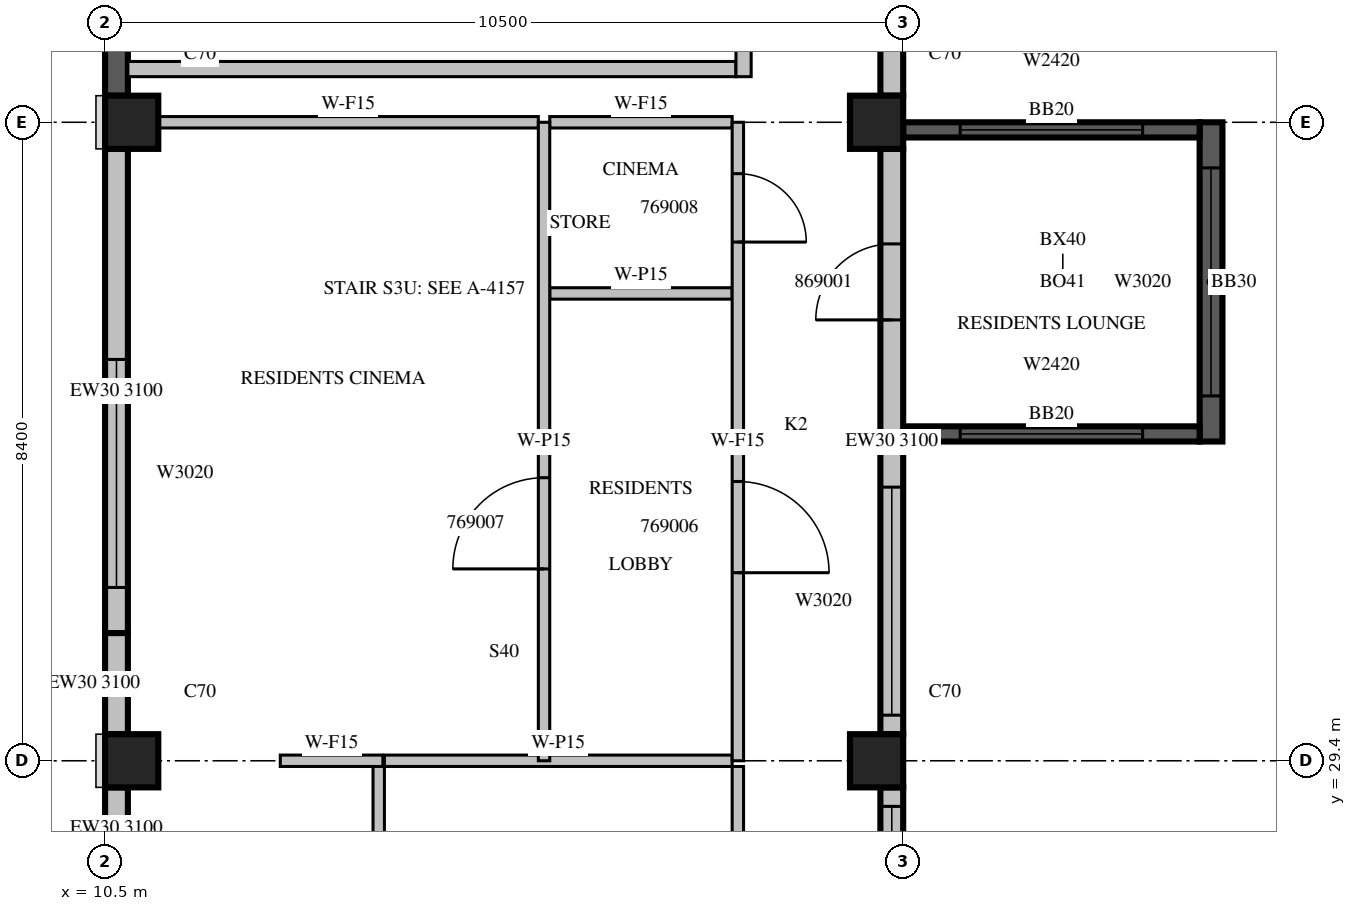
"""IFC4 building model, lengths in metres.
Left out: names, types, materials, properties, quantities, classifications, styles, units other than length and angle.
Written with IfcOpenShell. Run it as: python <this file> out.ifc"""

import sys

from ifc_helpers import new_model, si_unit, direction, frame, frame_2d, origin, origin_2d, place, context, subcontext, project, spatial, rectangle, extrude, source, transform, mapped, element, fill, save


model = new_model("IFC4")
c1 = context("Model", 3, precision=1e-05, world=origin(), true_north=direction((0.0, 1.0)))
c2 = subcontext(c1, "Body", "Model", "MODEL_VIEW")
j1 = project(units=[si_unit("LENGTHUNIT", "METRE"), si_unit("PLANEANGLEUNIT", "RADIAN")], contexts=[c1])
p1 = place(None, origin())
s1 = spatial("IfcSite", under=j1, at=p1, CompositionType="ELEMENT")
p2 = place(p1, origin())
s2 = spatial("IfcBuilding", under=s1, at=p2, CompositionType="ELEMENT")
p3 = place(p2, frame((0.0, 0.0, 302.0)))
s3 = spatial("IfcBuildingStorey", under=s2, at=p3, CompositionType="ELEMENT", Elevation=302.0)
m1 = source(origin(), c2, "Body", "SweptSolid", [
    extrude(rectangle(XDim=0.7, YDim=0.7, at=origin_2d()), origin(), (0.0, 0.0, 1.0), 3.5),
])
for number, where, z_axis, x_axis in (
    (1, (10.85, 29.4, 0.0), (0.0, 0.0, 1.0), (1.0, 0.0, 0.0)),
    (2, (20.65, 29.4, 0.0), (0.0, 0.0, 1.0), (1.0, 0.0, 0.0)),
    (3, (10.85, 37.8, 0.0), (0.0, 0.0, 1.0), (1.0, 0.0, 0.0)),
    (4, (20.65, 37.8, 0.0), (0.0, 0.0, 1.0), (1.0, 0.0, 0.0)),
):
    element("IfcColumn", number, at=place(p3, frame(where, z_axis=z_axis, x_axis=x_axis)), inside=s3, PredefinedType="COLUMN", context=c2, shape_type="MappedRepresentation", body=[
        mapped(m1, transform((0.0, 0.0, 0.0), scale=1.0)),
    ])
p4 = place(p3, frame((25.05, 33.6, 0.0), z_axis=(0.0, 0.0, 1.0), x_axis=(0.0, 1.0, 0.0)))
e5 = element("IfcWall", 5, at=p4, inside=s3, PredefinedType="SOLIDWALL", context=c2, shape_type="SweptSolid", body=[
    extrude(rectangle(XDim=4.2, YDim=0.3, at=frame_2d((2.1, 0.0))), origin(), (0.0, 0.0, 1.0), 3.1),
])
m2 = source(origin(), c2, "Body", "SweptSolid", [
    extrude(rectangle(XDim=3.0, YDim=2.0, at=frame_2d((1.5, 1.0))), frame((0.0, 0.16, 0.0), z_axis=(0.0, -1.0, 0.0), x_axis=(1.0, 0.0, 0.0)), (0.0, 0.0, 1.0), 0.32),
])
p5 = place(p4, frame((0.6, 0.0, 0.6)))
e6 = element("IfcOpeningElement", 6, at=p5, cuts=e5, PredefinedType="OPENING", context=c2, shape_type="MappedRepresentation", body=[
    mapped(m2, transform((0.0, 0.0, 0.0), scale=1.0)),
])
m3 = source(origin(), c2, "Body", "SweptSolid", [
    extrude(rectangle(XDim=3.9, YDim=0.2, at=frame_2d((1.95, 0.0))), origin(), (0.0, 0.0, 1.0), 3.1),
])
p6 = place(p3, frame((21.0, 33.7, 0.0), z_axis=(0.0, 0.0, 1.0), x_axis=(1.0, 0.0, 0.0)))
e7 = element("IfcWall", 7, at=p6, inside=s3, PredefinedType="SOLIDWALL", context=c2, shape_type="MappedRepresentation", body=[
    mapped(m3, transform((0.0, 0.0, 0.0), scale=1.0)),
])
m4 = source(origin(), c2, "Body", "SweptSolid", [
    extrude(rectangle(XDim=2.4, YDim=2.0, at=frame_2d((1.2, 1.0))), frame((0.0, 0.11, 0.0), z_axis=(0.0, -1.0, 0.0), x_axis=(1.0, 0.0, 0.0)), (0.0, 0.0, 1.0), 0.22),
])
p7 = place(p6, frame((0.75, 0.0, 0.6)))
e8 = element("IfcOpeningElement", 8, at=p7, cuts=e7, PredefinedType="OPENING", context=c2, shape_type="MappedRepresentation", body=[
    mapped(m4, transform((0.0, 0.0, 0.0), scale=1.0)),
])
p8 = place(p3, frame((21.0, 37.7, 0.0), z_axis=(0.0, 0.0, 1.0), x_axis=(1.0, 0.0, 0.0)))
e9 = element("IfcWall", 9, at=p8, inside=s3, PredefinedType="SOLIDWALL", context=c2, shape_type="MappedRepresentation", body=[
    mapped(m3, transform((0.0, 0.0, 0.0), scale=1.0)),
])
p9 = place(p8, frame((0.75, 0.0, 0.6)))
e10 = element("IfcOpeningElement", 10, at=p9, cuts=e9, PredefinedType="OPENING", context=c2, shape_type="MappedRepresentation", body=[
    mapped(m4, transform((0.0, 0.0, 0.0), scale=1.0)),
])
m5 = source(origin(), c2, "Body", "SweptSolid", [
    extrude(rectangle(XDim=7.45, YDim=0.3, at=frame_2d((3.725, 0.0))), origin(), (0.0, 0.0, 1.0), 3.1),
])
p10 = place(p3, frame((20.85, 21.6, 0.0), z_axis=(0.0, 0.0, 1.0), x_axis=(0.0, 1.0, 0.0)))
e11 = element("IfcWall", 11, at=p10, inside=s3, PredefinedType="STANDARD", context=c2, shape_type="MappedRepresentation", body=[
    mapped(m5, transform((0.0, 0.0, 0.0), scale=1.0)),
])
m6 = source(origin(), c2, "Body", "SweptSolid", [
    extrude(rectangle(XDim=2.4, YDim=2.0, at=frame_2d((1.2, 1.0))), frame((0.0, 0.16, 0.0), z_axis=(0.0, -1.0, 0.0), x_axis=(1.0, 0.0, 0.0)), (0.0, 0.0, 1.0), 0.32),
])
p11 = place(p10, frame((0.3, 0.0, 0.6)))
e12 = element("IfcOpeningElement", 12, at=p11, cuts=e11, PredefinedType="OPENING", context=c2, shape_type="MappedRepresentation", body=[
    mapped(m6, transform((0.0, 0.0, 0.0), scale=1.0)),
])
p12 = place(p10, frame((4.2, 0.0, 0.6)))
e13 = element("IfcOpeningElement", 13, at=p12, cuts=e11, PredefinedType="OPENING", context=c2, shape_type="MappedRepresentation", body=[
    mapped(m2, transform((0.0, 0.0, 0.0), scale=1.0)),
])
m7 = source(origin(), c2, "Body", "SweptSolid", [
    extrude(rectangle(XDim=7.7, YDim=0.3, at=frame_2d((3.85, 0.0))), origin(), (0.0, 0.0, 1.0), 3.1),
])
p13 = place(p3, frame((20.85, 29.75, 0.0), z_axis=(0.0, 0.0, 1.0), x_axis=(0.0, 1.0, 0.0)))
e14 = element("IfcWall", 14, at=p13, inside=s3, PredefinedType="STANDARD", context=c2, shape_type="MappedRepresentation", body=[
    mapped(m7, transform((0.0, 0.0, 0.0), scale=1.0)),
])
p14 = place(p13, frame((0.25, 0.0, 0.6)))
e15 = element("IfcOpeningElement", 15, at=p14, cuts=e14, PredefinedType="OPENING", context=c2, shape_type="MappedRepresentation", body=[
    mapped(m2, transform((0.0, 0.0, 0.0), scale=1.0)),
])
m8 = source(origin(), c2, "Body", "SweptSolid", [
    extrude(rectangle(XDim=1.0, YDim=2.1, at=frame_2d((0.5, 1.05))), frame((0.0, 0.16, 0.0), z_axis=(0.0, -1.0, 0.0), x_axis=(1.0, 0.0, 0.0)), (0.0, 0.0, 1.0), 0.32),
])
p15 = place(p13, frame((5.45, 0.0, 0.0)))
e16 = element("IfcOpeningElement", 16, at=p15, cuts=e14, PredefinedType="OPENING", context=c2, shape_type="MappedRepresentation", body=[
    mapped(m8, transform((0.0, 0.0, 0.0), scale=1.0)),
])
m9 = source(origin(), c2, "Body", "SweptSolid", [
    extrude(rectangle(XDim=5.53, YDim=0.3, at=frame_2d((2.765, 0.0))), origin(), (0.0, 0.0, 1.0), 3.1),
])
p16 = place(p3, frame((20.85, 38.15, 0.0), z_axis=(0.0, 0.0, 1.0), x_axis=(0.0, 1.0, 0.0)))
e17 = element("IfcWall", 17, at=p16, inside=s3, PredefinedType="STANDARD", context=c2, shape_type="MappedRepresentation", body=[
    mapped(m9, transform((0.0, 0.0, 0.0), scale=1.0)),
])
m10 = source(origin(), c2, "Body", "SweptSolid", [
    extrude(rectangle(XDim=3.6, YDim=2.0, at=frame_2d((1.8, 1.0))), frame((0.0, 0.16, 0.0), z_axis=(0.0, -1.0, 0.0), x_axis=(1.0, 0.0, 0.0)), (0.0, 0.0, 1.0), 0.32),
])
p17 = place(p16, frame((0.79, 0.0, 0.6)))
e18 = element("IfcOpeningElement", 18, at=p17, cuts=e17, PredefinedType="OPENING", context=c2, shape_type="MappedRepresentation", body=[
    mapped(m10, transform((0.0, 0.0, 0.0), scale=1.0)),
])
m11 = source(origin(), c2, "Body", "SweptSolid", [
    extrude(rectangle(XDim=5.53, YDim=0.3, at=frame_2d((2.765, 0.0))), origin(), (0.0, 0.0, 1.0), 3.1),
])
p18 = place(p3, frame((10.65, 43.68, 0.0), z_axis=(0.0, 0.0, 1.0), x_axis=(0.0, -1.0, 0.0)))
e19 = element("IfcWall", 19, at=p18, inside=s3, PredefinedType="SOLIDWALL", context=c2, shape_type="MappedRepresentation", body=[
    mapped(m11, transform((0.0, 0.0, 0.0), scale=1.0)),
])
m12 = source(origin(), c2, "Body", "SweptSolid", [
    extrude(rectangle(XDim=6.37, YDim=0.3, at=frame_2d((3.185, 0.0))), origin(), (0.0, 0.0, 1.0), 3.1),
])
p19 = place(p3, frame((10.65, 37.45, 0.0), z_axis=(0.0, 0.0, 1.0), x_axis=(0.0, -1.0, 0.0)))
e20 = element("IfcWall", 20, at=p19, inside=s3, PredefinedType="STANDARD", context=c2, shape_type="MappedRepresentation", body=[
    mapped(m12, transform((0.0, 0.0, 0.0), scale=1.0)),
])
p20 = place(p19, frame((2.77, 0.0, 0.6)))
e21 = element("IfcOpeningElement", 21, at=p20, cuts=e20, PredefinedType="OPENING", context=c2, shape_type="MappedRepresentation", body=[
    mapped(m2, transform((0.0, 0.0, 0.0), scale=1.0)),
])
m13 = source(origin(), c2, "Body", "SweptSolid", [
    extrude(rectangle(XDim=1.33, YDim=0.3, at=frame_2d((0.665, 0.0))), origin(), (0.0, 0.0, 1.0), 3.1),
])
p21 = place(p3, frame((10.65, 31.08, 0.0), z_axis=(0.0, 0.0, 1.0), x_axis=(0.0, -1.0, 0.0)))
e22 = element("IfcWall", 22, at=p21, inside=s3, PredefinedType="STANDARD", context=c2, shape_type="MappedRepresentation", body=[
    mapped(m13, transform((0.0, 0.0, 0.0), scale=1.0)),
])
m14 = source(origin(), c2, "Body", "SweptSolid", [
    extrude(rectangle(XDim=2.17, YDim=0.3, at=frame_2d((1.085, 0.0))), origin(), (0.0, 0.0, 1.0), 3.1),
])
p22 = place(p3, frame((10.65, 29.05, 0.0), z_axis=(0.0, 0.0, 1.0), x_axis=(0.0, -1.0, 0.0)))
e23 = element("IfcWall", 23, at=p22, inside=s3, PredefinedType="STANDARD", context=c2, shape_type="MappedRepresentation", body=[
    mapped(m14, transform((0.0, 0.0, 0.0), scale=1.0)),
])
m15 = source(origin(), c2, "Body", "SweptSolid", [
    extrude(rectangle(XDim=1.2, YDim=2.0, at=frame_2d((0.6, 1.0))), frame((0.0, 0.16, 0.0), z_axis=(0.0, -1.0, 0.0), x_axis=(1.0, 0.0, 0.0)), (0.0, 0.0, 1.0), 0.32),
])
p23 = place(p22, frame((0.485, 0.0, 0.6)))
e24 = element("IfcOpeningElement", 24, at=p23, cuts=e23, PredefinedType="OPENING", context=c2, shape_type="MappedRepresentation", body=[
    mapped(m15, transform((0.0, 0.0, 0.0), scale=1.0)),
])
m16 = source(origin(), c2, "Body", "SweptSolid", [
    extrude(rectangle(XDim=8.0, YDim=0.2, at=frame_2d((4.0, 0.0))), origin(), (0.0, 0.0, 1.0), 3.1),
])
p24 = place(p3, frame((10.8, 38.5, 0.0), z_axis=(0.0, 0.0, 1.0), x_axis=(1.0, 0.0, 0.0)))
e25 = element("IfcWall", 25, at=p24, inside=s3, PredefinedType="PARTITIONING", context=c2, shape_type="MappedRepresentation", body=[
    mapped(m16, transform((0.0, 0.0, 0.0), scale=1.0)),
])
m17 = source(origin(), c2, "Body", "SweptSolid", [
    extrude(rectangle(XDim=5.45, YDim=0.2, at=frame_2d((2.725, 0.0))), origin(), (0.0, 0.0, 1.0), 3.1),
])
p25 = place(p3, frame((18.9, 38.4, 0.0), z_axis=(0.0, 0.0, 1.0), x_axis=(0.0, 1.0, 0.0)))
e26 = element("IfcWall", 26, at=p25, inside=s3, PredefinedType="PARTITIONING", context=c2, shape_type="MappedRepresentation", body=[
    mapped(m17, transform((0.0, 0.0, 0.0), scale=1.0)),
])
m18 = source(origin(), c2, "Body", "SweptSolid", [
    extrude(rectangle(XDim=1.2, YDim=2.1, at=frame_2d((0.6, 1.05))), frame((0.0, 0.11, 0.0), z_axis=(0.0, -1.0, 0.0), x_axis=(1.0, 0.0, 0.0)), (0.0, 0.0, 1.0), 0.22),
])
p26 = place(p25, frame((0.4, 0.0, 0.0)))
e27 = element("IfcOpeningElement", 27, at=p26, cuts=e26, PredefinedType="OPENING", context=c2, shape_type="MappedRepresentation", body=[
    mapped(m18, transform((0.0, 0.0, 0.0), scale=1.0)),
])
m19 = source(origin(), c2, "Body", "SweptSolid", [
    extrude(rectangle(XDim=0.9, YDim=2.1, at=frame_2d((0.45, 1.05))), frame((0.0, 0.11, 0.0), z_axis=(0.0, -1.0, 0.0), x_axis=(1.0, 0.0, 0.0)), (0.0, 0.0, 1.0), 0.22),
])
p27 = place(p25, frame((3.25, 0.0, 0.0)))
e28 = element("IfcOpeningElement", 28, at=p27, cuts=e26, PredefinedType="OPENING", context=c2, shape_type="MappedRepresentation", body=[
    mapped(m19, transform((0.0, 0.0, 0.0), scale=1.0)),
])
m20 = source(origin(), c2, "Body", "SweptSolid", [
    extrude(rectangle(XDim=4.575, YDim=0.15, at=frame_2d((2.288, 0.0))), origin(), (0.0, 0.0, 1.0), 3.1),
])
p28 = place(p3, frame((18.75, 29.4, 0.0), z_axis=(0.0, 0.0, 1.0), x_axis=(-1.0, 0.0, 0.0)))
e29 = element("IfcWall", 29, at=p28, inside=s3, PredefinedType="PARTITIONING", context=c2, shape_type="MappedRepresentation", body=[
    mapped(m20, transform((0.0, 0.0, 0.0), scale=1.0)),
])
m21 = source(origin(), c2, "Body", "SweptSolid", [
    extrude(rectangle(XDim=5.75, YDim=0.15, at=frame_2d((2.875, 0.0))), origin(), (0.0, 0.0, 1.0), 3.1),
])
p29 = place(p3, frame((18.825, 23.575, 0.0), z_axis=(0.0, 0.0, 1.0), x_axis=(0.0, 1.0, 0.0)))
e30 = element("IfcWall", 30, at=p29, inside=s3, PredefinedType="PARTITIONING", context=c2, shape_type="MappedRepresentation", body=[
    mapped(m21, transform((0.0, 0.0, 0.0), scale=1.0)),
])
m22 = source(origin(), c2, "Body", "SweptSolid", [
    extrude(rectangle(XDim=1.0, YDim=2.1, at=frame_2d((0.5, 1.05))), frame((0.0, 0.085, 0.0), z_axis=(0.0, -1.0, 0.0), x_axis=(1.0, 0.0, 0.0)), (0.0, 0.0, 1.0), 0.17),
])
p30 = place(p29, frame((2.375, 0.0, 0.0)))
e31 = element("IfcOpeningElement", 31, at=p30, cuts=e30, PredefinedType="OPENING", context=c2, shape_type="MappedRepresentation", body=[
    mapped(m22, transform((0.0, 0.0, 0.0), scale=1.0)),
])
m23 = source(origin(), c2, "Body", "SweptSolid", [
    extrude(rectangle(XDim=7.725, YDim=0.15, at=frame_2d((3.862, 0.0))), origin(), (0.0, 0.0, 1.0), 3.1),
])
p31 = place(p3, frame((14.1, 29.325, 0.0), z_axis=(0.0, 0.0, 1.0), x_axis=(0.0, -1.0, 0.0)))
e32 = element("IfcWall", 32, at=p31, inside=s3, PredefinedType="PARTITIONING", context=c2, shape_type="MappedRepresentation", body=[
    mapped(m23, transform((0.0, 0.0, 0.0), scale=1.0)),
])
p32 = place(p31, frame((6.275, 0.0, 0.0)))
e33 = element("IfcOpeningElement", 33, at=p32, cuts=e32, PredefinedType="OPENING", context=c2, shape_type="MappedRepresentation", body=[
    mapped(m22, transform((0.0, 0.0, 0.0), scale=1.0)),
])
m24 = source(origin(), c2, "Body", "SweptSolid", [
    extrude(rectangle(XDim=2.4, YDim=0.15, at=frame_2d((1.2, 0.0))), origin(), (0.0, 0.0, 1.0), 3.1),
])
p33 = place(p3, frame((18.75, 35.548, 0.0), z_axis=(0.0, 0.0, 1.0), x_axis=(-1.0, 0.0, 0.0)))
e34 = element("IfcWall", 34, at=p33, inside=s3, PredefinedType="PARTITIONING", context=c2, shape_type="MappedRepresentation", body=[
    mapped(m24, transform((0.0, 0.0, 0.0), scale=1.0)),
])
m25 = source(origin(), c2, "Body", "SweptSolid", [
    extrude(rectangle(XDim=1.35, YDim=0.15, at=frame_2d((0.675, 0.0))), origin(), (0.0, 0.0, 1.0), 3.1),
])
p34 = place(p3, frame((14.155, 29.4, 0.0), z_axis=(0.0, 0.0, 1.0), x_axis=(-1.0, 0.0, 0.0)))
e35 = element("IfcWall", 35, at=p34, inside=s3, PredefinedType="PARTITIONING", context=c2, shape_type="MappedRepresentation", body=[
    mapped(m25, transform((0.0, 0.0, 0.0), scale=1.0)),
])
m26 = source(origin(), c2, "Body", "SweptSolid", [
    extrude(rectangle(XDim=5.001, YDim=0.15, at=frame_2d((2.501, 0.0))), origin(), (0.0, 0.0, 1.0), 3.1),
])
p35 = place(p3, frame((16.2, 37.8, 0.0), z_axis=(0.0, 0.0, 1.0), x_axis=(-1.0, 0.0, 0.0)))
e36 = element("IfcWall", 36, at=p35, inside=s3, PredefinedType="PARTITIONING", context=c2, shape_type="MappedRepresentation", body=[
    mapped(m26, transform((0.0, 0.0, 0.0), scale=1.0)),
])
p36 = place(p3, frame((18.75, 37.8, 0.0), z_axis=(0.0, 0.0, 1.0), x_axis=(-1.0, 0.0, 0.0)))
e37 = element("IfcWall", 37, at=p36, inside=s3, PredefinedType="PARTITIONING", context=c2, shape_type="MappedRepresentation", body=[
    mapped(m24, transform((0.0, 0.0, 0.0), scale=1.0)),
])
m27 = source(origin(), c2, "Body", "SweptSolid", [
    extrude(rectangle(XDim=8.4, YDim=0.15, at=frame_2d((4.2, 0.0))), origin(), (0.0, 0.0, 1.0), 3.1),
])
p37 = place(p3, frame((16.275, 29.4, 0.0), z_axis=(0.0, 0.0, 1.0), x_axis=(0.0, 1.0, 0.0)))
e38 = element("IfcWall", 38, at=p37, inside=s3, PredefinedType="PARTITIONING", context=c2, shape_type="MappedRepresentation", body=[
    mapped(m27, transform((0.0, 0.0, 0.0), scale=1.0)),
])
m28 = source(origin(), c2, "Body", "SweptSolid", [
    extrude(rectangle(XDim=1.2, YDim=2.1, at=frame_2d((0.6, 1.05))), frame((0.0, 0.085, 0.0), z_axis=(0.0, -1.0, 0.0), x_axis=(1.0, 0.0, 0.0)), (0.0, 0.0, 1.0), 0.17),
])
p38 = place(p37, frame((2.524, 0.0, 0.0)))
e39 = element("IfcOpeningElement", 39, at=p38, cuts=e38, PredefinedType="OPENING", context=c2, shape_type="MappedRepresentation", body=[
    mapped(m28, transform((0.0, 0.0, 0.0), scale=1.0)),
])
p39 = place(p3, frame((18.825, 29.4, 0.0), z_axis=(0.0, 0.0, 1.0), x_axis=(0.0, 1.0, 0.0)))
e40 = element("IfcWall", 40, at=p39, inside=s3, PredefinedType="PARTITIONING", context=c2, shape_type="MappedRepresentation", body=[
    mapped(m27, transform((0.0, 0.0, 0.0), scale=1.0)),
])
p40 = place(p39, frame((2.474, 0.0, 0.0)))
e41 = element("IfcOpeningElement", 41, at=p40, cuts=e40, PredefinedType="OPENING", context=c2, shape_type="MappedRepresentation", body=[
    mapped(m28, transform((0.0, 0.0, 0.0), scale=1.0)),
])
m29 = source(origin(), c2, "Body", "SweptSolid", [
    extrude(rectangle(XDim=0.9, YDim=2.1, at=frame_2d((0.45, 1.05))), frame((0.0, 0.085, 0.0), z_axis=(0.0, -1.0, 0.0), x_axis=(1.0, 0.0, 0.0)), (0.0, 0.0, 1.0), 0.17),
])
p41 = place(p39, frame((6.824, 0.0, 0.0)))
e42 = element("IfcOpeningElement", 42, at=p41, cuts=e40, PredefinedType="OPENING", context=c2, shape_type="MappedRepresentation", body=[
    mapped(m29, transform((0.0, 0.0, 0.0), scale=1.0)),
])
m30 = source(origin(), c2, "Body", "SweptSolid", [
    extrude(rectangle(XDim=3.0, YDim=2.0, at=frame_2d((1.5, 1.0))), frame((0.0, 0.03, 0.0), z_axis=(0.0, -1.0, 0.0), x_axis=(1.0, 0.0, 0.0)), (0.0, 0.0, 1.0), 0.06),
])
p42 = place(p5, origin())
e43 = element("IfcWindow", 43, at=p42, inside=s3, PartitioningType="SINGLE_PANEL", PredefinedType="WINDOW", context=c2, shape_type="MappedRepresentation", body=[
    mapped(m30, transform((0.0, 0.0, 0.0), scale=1.0)),
])
fill(e6, e43)
m31 = source(origin(), c2, "Body", "SweptSolid", [
    extrude(rectangle(XDim=2.4, YDim=2.0, at=frame_2d((1.2, 1.0))), frame((0.0, 0.03, 0.0), z_axis=(0.0, -1.0, 0.0), x_axis=(1.0, 0.0, 0.0)), (0.0, 0.0, 1.0), 0.06),
])
p43 = place(p7, origin())
e44 = element("IfcWindow", 44, at=p43, inside=s3, PartitioningType="SINGLE_PANEL", PredefinedType="WINDOW", context=c2, shape_type="MappedRepresentation", body=[
    mapped(m31, transform((0.0, 0.0, 0.0), scale=1.0)),
])
fill(e8, e44)
p44 = place(p9, origin())
e45 = element("IfcWindow", 45, at=p44, inside=s3, PartitioningType="SINGLE_PANEL", PredefinedType="WINDOW", context=c2, shape_type="MappedRepresentation", body=[
    mapped(m31, transform((0.0, 0.0, 0.0), scale=1.0)),
])
fill(e10, e45)
p45 = place(p12, origin())
e46 = element("IfcWindow", 46, at=p45, inside=s3, PartitioningType="SINGLE_PANEL", PredefinedType="WINDOW", context=c2, shape_type="MappedRepresentation", body=[
    mapped(m30, transform((0.0, 0.0, 0.0), scale=1.0)),
])
fill(e13, e46)
p46 = place(p14, origin())
e47 = element("IfcWindow", 47, at=p46, inside=s3, PartitioningType="SINGLE_PANEL", PredefinedType="WINDOW", context=c2, shape_type="MappedRepresentation", body=[
    mapped(m30, transform((0.0, 0.0, 0.0), scale=1.0)),
])
fill(e15, e47)
p47 = place(p20, origin())
e48 = element("IfcWindow", 48, at=p47, inside=s3, PartitioningType="SINGLE_PANEL", PredefinedType="WINDOW", context=c2, shape_type="MappedRepresentation", body=[
    mapped(m30, transform((0.0, 0.0, 0.0), scale=1.0)),
])
fill(e21, e48)
m32 = source(origin(), c2, "Body", "SweptSolid", [
    extrude(rectangle(XDim=1.2, YDim=2.0, at=frame_2d((0.6, 1.0))), frame((0.0, 0.03, 0.0), z_axis=(0.0, -1.0, 0.0), x_axis=(1.0, 0.0, 0.0)), (0.0, 0.0, 1.0), 0.06),
])
p48 = place(p23, origin())
e49 = element("IfcWindow", 49, at=p48, inside=s3, PartitioningType="SINGLE_PANEL", PredefinedType="WINDOW", context=c2, shape_type="MappedRepresentation", body=[
    mapped(m32, transform((0.0, 0.0, 0.0), scale=1.0)),
])
fill(e24, e49)
m33 = source(origin(), c2, "Body", "SweptSolid", [
    extrude(rectangle(XDim=1.2, YDim=2.1, at=frame_2d((0.6, 1.05))), frame((0.0, 0.025, 0.0), z_axis=(0.0, -1.0, 0.0), x_axis=(1.0, 0.0, 0.0)), (0.0, 0.0, 1.0), 0.05),
])
p49 = place(p40, origin())
e50 = element("IfcDoor", 50, at=p49, inside=s3, OperationType="SINGLE_SWING_RIGHT", PredefinedType="DOOR", context=c2, shape_type="MappedRepresentation", body=[
    mapped(m33, transform((0.0, 0.0, 0.0), scale=1.0)),
])
fill(e41, e50)
p50 = place(p38, origin())
e51 = element("IfcDoor", 51, at=p50, inside=s3, OperationType="SINGLE_SWING_LEFT", PredefinedType="DOOR", context=c2, shape_type="MappedRepresentation", body=[
    mapped(m33, transform((0.0, 0.0, 0.0), scale=1.0)),
])
fill(e39, e51)
m34 = source(origin(), c2, "Body", "SweptSolid", [
    extrude(rectangle(XDim=0.9, YDim=2.1, at=frame_2d((0.45, 1.05))), frame((0.0, 0.025, 0.0), z_axis=(0.0, -1.0, 0.0), x_axis=(1.0, 0.0, 0.0)), (0.0, 0.0, 1.0), 0.05),
])
p51 = place(p41, origin())
e52 = element("IfcDoor", 52, at=p51, inside=s3, OperationType="SINGLE_SWING_RIGHT", PredefinedType="DOOR", context=c2, shape_type="MappedRepresentation", body=[
    mapped(m34, transform((0.0, 0.0, 0.0), scale=1.0)),
])
fill(e42, e52)
m35 = source(origin(), c2, "Body", "SweptSolid", [
    extrude(rectangle(XDim=1.0, YDim=2.1, at=frame_2d((0.5, 1.05))), frame((0.0, 0.025, 0.0), z_axis=(0.0, -1.0, 0.0), x_axis=(1.0, 0.0, 0.0)), (0.0, 0.0, 1.0), 0.05),
])
p52 = place(p15, origin())
e53 = element("IfcDoor", 53, at=p52, inside=s3, OperationType="SINGLE_SWING_LEFT", PredefinedType="DOOR", context=c2, shape_type="MappedRepresentation", body=[
    mapped(m35, transform((0.0, 0.0, 0.0), scale=1.0)),
])
fill(e16, e53)
save(model, sys.argv[1])
